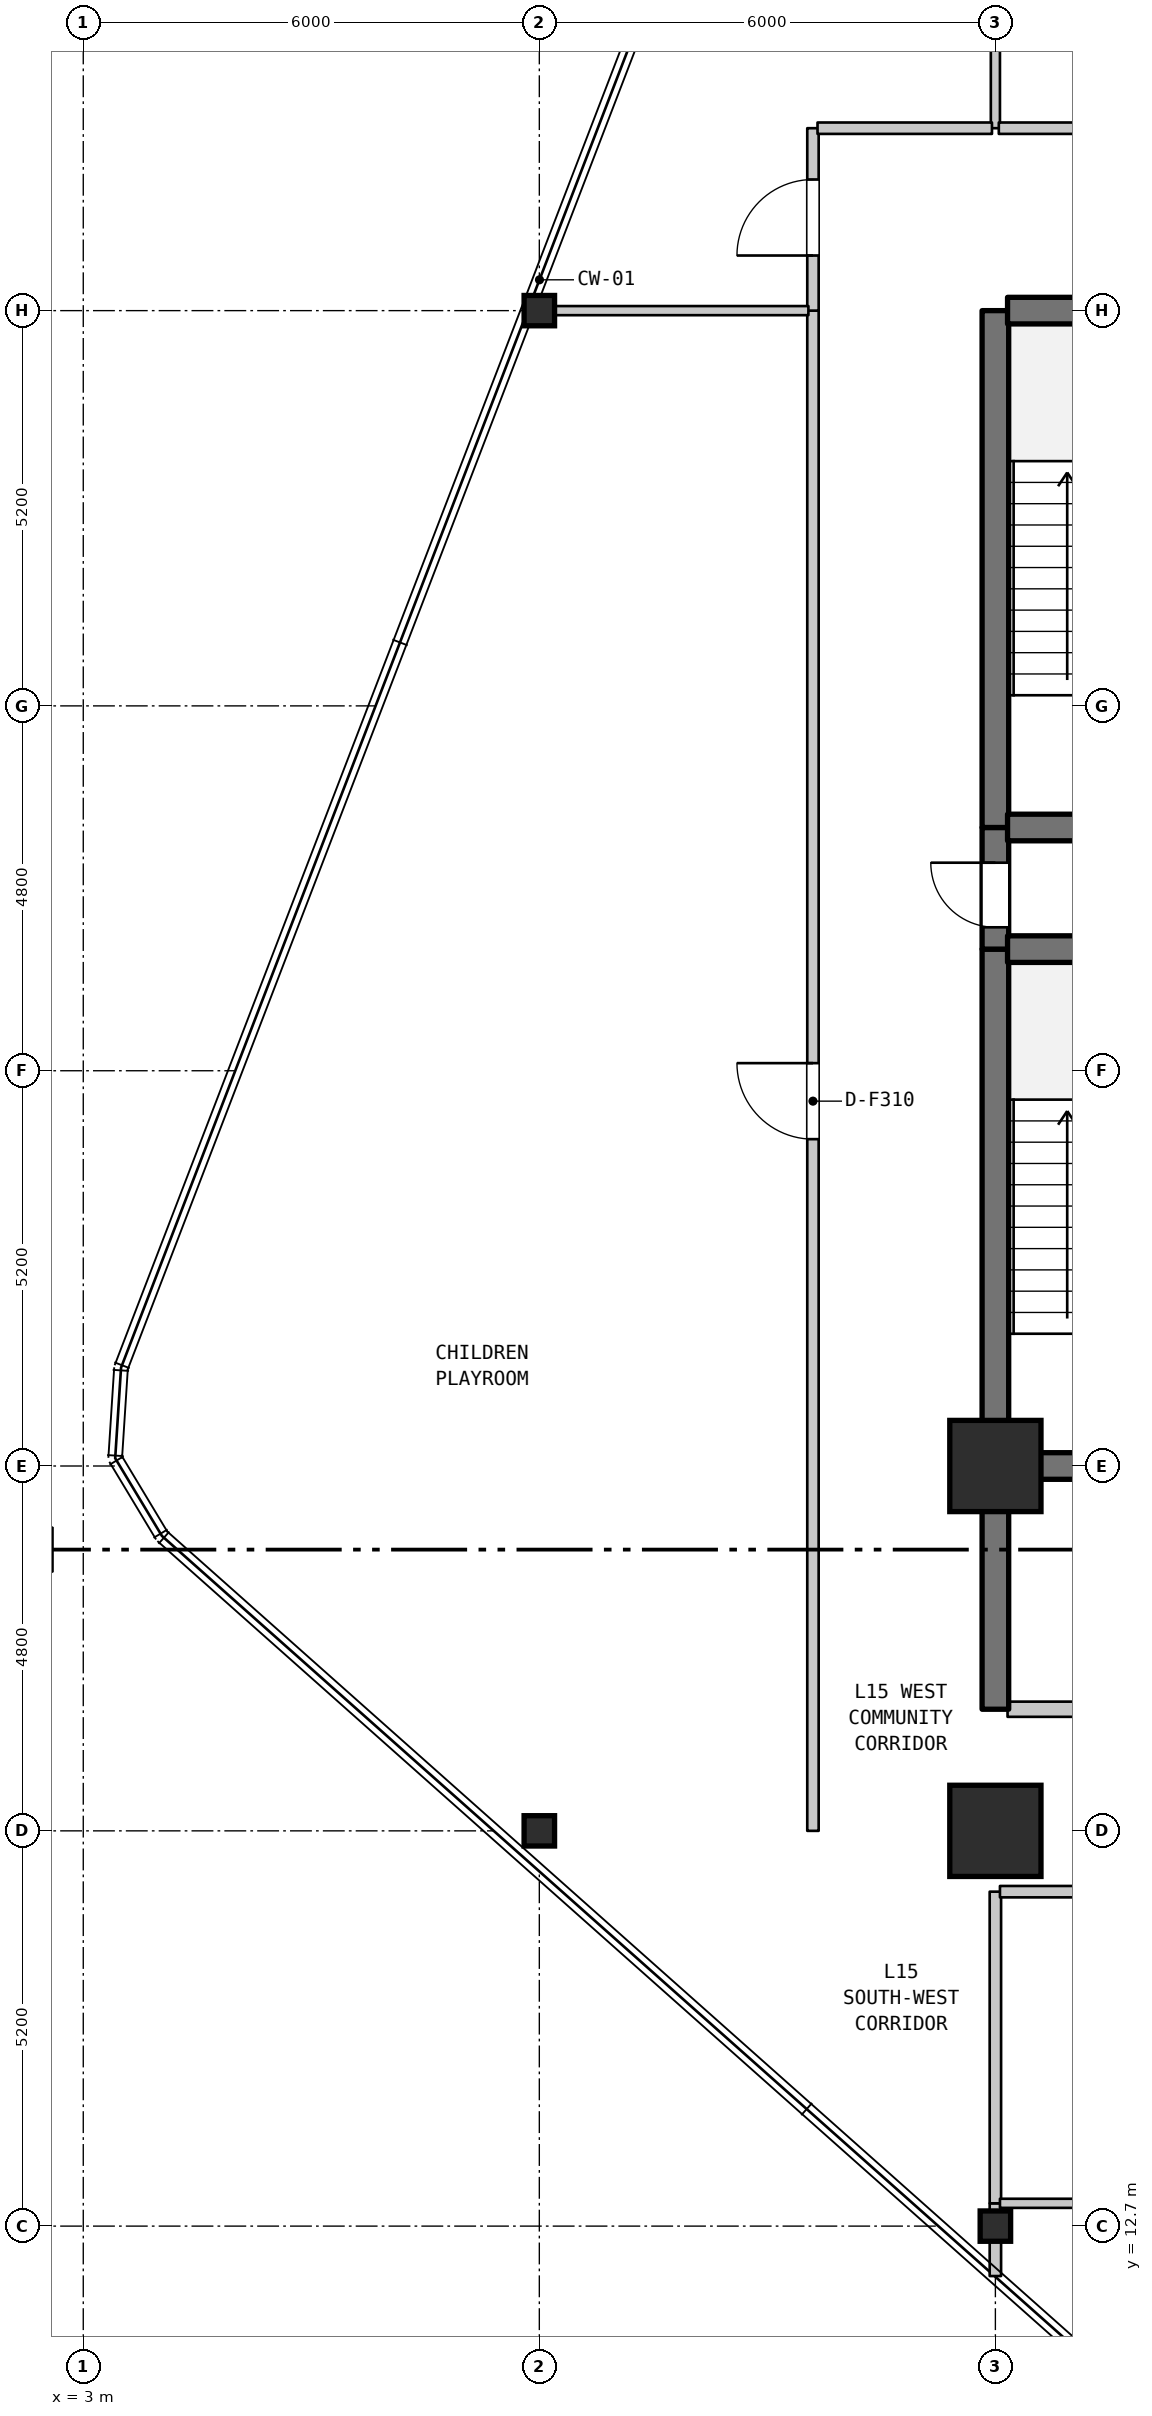
"""IFC4 building model, lengths in metres.
Left out: names, types, materials, properties, quantities, classifications, styles, units other than length and angle.
Written with IfcOpenShell. Run it as: python <this file> out.ifc"""

import sys

from ifc_helpers import new_model, si_unit, direction, frame, frame_2d, origin, origin_2d, place, context, subcontext, project, spatial, rectangle, i_section, extrude, element, fill, save


model = new_model("IFC4")
c1 = context("Model", 3, precision=1e-05, world=origin(), true_north=direction((0.0, 1.0)))
c2 = subcontext(c1, "Body", "Model", "MODEL_VIEW")
j1 = project(units=[si_unit("LENGTHUNIT", "METRE"), si_unit("PLANEANGLEUNIT", "RADIAN")], contexts=[c1])
p1 = place(None, origin())
s1 = spatial("IfcSite", under=j1, at=p1, CompositionType="ELEMENT")
p2 = place(p1, origin())
s2 = spatial("IfcBuilding", under=s1, at=p2, CompositionType="ELEMENT")
p3 = place(p2, frame((0.0, 0.0, 65.6)))
s3 = spatial("IfcBuildingStorey", under=s2, at=p3, CompositionType="ELEMENT", Elevation=65.6)
for number, where, z_axis, x_axis in (
    (1, (9.0, 17.9, 0.0), (0.0, 0.0, 1.0), (1.0, 0.0, 0.0)),
    (2, (9.0, 37.9, 0.0), (0.0, 0.0, 1.0), (1.0, 0.0, 0.0)),
    (3, (15.0, 12.7, 0.0), (0.0, 0.0, 1.0), (1.0, 0.0, 0.0)),
):
    element("IfcColumn", number, at=place(p3, frame(where, z_axis=z_axis, x_axis=x_axis)), inside=s3, PredefinedType="COLUMN", context=c2, shape_type="SweptSolid", body=[
        extrude(i_section(OverallWidth=0.401, OverallDepth=0.399, WebThickness=0.025, FlangeThickness=0.04, FilletRadius=0.015, at=origin_2d()), origin(), (0.0, 0.0, 1.0), 4.5),
    ])
for number, where, z_axis, x_axis in (
    (4, (15.0, 17.9, 0.0), (0.0, 0.0, 1.0), (1.0, 0.0, 0.0)),
    (5, (15.0, 22.7, 0.0), (0.0, 0.0, 1.0), (1.0, 0.0, 0.0)),
):
    element("IfcColumn", number, at=place(p3, frame(where, z_axis=z_axis, x_axis=x_axis)), inside=s3, PredefinedType="COLUMN", context=c2, shape_type="SweptSolid", body=[
        extrude(rectangle(XDim=1.2, YDim=1.2, at=origin_2d()), origin(), (0.0, 0.0, 1.0), 4.5),
    ])
p4 = place(p3, frame((12.6, 17.9, 0.0), z_axis=(0.0, 0.0, 1.0), x_axis=(0.0, 1.0, 0.0)))
e6 = element("IfcWall", 6, at=p4, inside=s3, PredefinedType="STANDARD", context=c2, shape_type="SweptSolid", body=[
    extrude(rectangle(XDim=20.0, YDim=0.15, at=frame_2d((10.0, 0.0))), origin(), (0.0, 0.0, 1.0), 4.185),
])
p5 = place(p4, frame((9.1, 0.0, 0.0)))
e7 = element("IfcOpeningElement", 7, at=p5, cuts=e6, PredefinedType="OPENING", context=c2, shape_type="SweptSolid", body=[
    extrude(rectangle(XDim=1.0, YDim=2.15, at=frame_2d((0.5, 1.075))), frame((0.0, 0.085, 0.0), z_axis=(0.0, -1.0, 0.0), x_axis=(1.0, 0.0, 0.0)), (0.0, 0.0, 1.0), 0.17),
])
p6 = place(p3, frame((12.6, 37.9, 0.0), z_axis=(0.0, 0.0, 1.0), x_axis=(0.0, 1.0, 0.0)))
e8 = element("IfcWall", 8, at=p6, inside=s3, PredefinedType="STANDARD", context=c2, shape_type="SweptSolid", body=[
    extrude(rectangle(XDim=2.4, YDim=0.15, at=frame_2d((1.2, 0.0))), origin(), (0.0, 0.0, 1.0), 4.185),
])
p7 = place(p6, frame((0.725, 0.0, 0.0)))
e9 = element("IfcOpeningElement", 9, at=p7, cuts=e8, PredefinedType="OPENING", context=c2, shape_type="SweptSolid", body=[
    extrude(rectangle(XDim=1.0, YDim=2.15, at=frame_2d((0.5, 1.075))), frame((0.0, 0.085, 0.0), z_axis=(0.0, -1.0, 0.0), x_axis=(1.0, 0.0, 0.0)), (0.0, 0.0, 1.0), 0.17),
])
p8 = place(p3, frame((15.0, 12.043, 0.0), z_axis=(0.0, 0.0, 1.0), x_axis=(0.0, 1.0, 0.0)))
e10 = element("IfcWall", 10, at=p8, inside=s3, PredefinedType="STANDARD", context=c2, shape_type="SweptSolid", body=[
    extrude(rectangle(XDim=0.957, YDim=0.15, at=frame_2d((0.479, 0.0))), origin(), (0.0, 0.0, 1.0), 4.185),
])
p9 = place(p3, frame((15.0, 13.0, 0.0), z_axis=(0.0, 0.0, 1.0), x_axis=(0.0, 1.0, 0.0)))
e11 = element("IfcWall", 11, at=p9, inside=s3, PredefinedType="STANDARD", context=c2, shape_type="SweptSolid", body=[
    extrude(rectangle(XDim=4.1, YDim=0.15, at=frame_2d((2.05, 0.0))), origin(), (0.0, 0.0, 1.0), 3.685),
])
p10 = place(p3, frame((15.0, 19.5, 0.0), z_axis=(0.0, 0.0, 1.0), x_axis=(0.0, 1.0, 0.0)))
e12 = element("IfcWall", 12, at=p10, inside=s3, PredefinedType="SHEAR", context=c2, shape_type="SweptSolid", body=[
    extrude(rectangle(XDim=3.2, YDim=0.35, at=frame_2d((1.6, 0.0))), origin(), (0.0, 0.0, 1.0), 4.185),
])
p11 = place(p3, frame((15.0, 22.7, 0.0), z_axis=(0.0, 0.0, 1.0), x_axis=(0.0, 1.0, 0.0)))
e13 = element("IfcWall", 13, at=p11, inside=s3, PredefinedType="SHEAR", context=c2, shape_type="SweptSolid", body=[
    extrude(rectangle(XDim=6.8, YDim=0.35, at=frame_2d((3.4, 0.0))), origin(), (0.0, 0.0, 1.0), 4.185),
])
p12 = place(p3, frame((15.0, 29.5, 0.0), z_axis=(0.0, 0.0, 1.0), x_axis=(0.0, 1.0, 0.0)))
e14 = element("IfcWall", 14, at=p12, inside=s3, PredefinedType="SHEAR", context=c2, shape_type="SweptSolid", body=[
    extrude(rectangle(XDim=1.6, YDim=0.35, at=frame_2d((0.8, 0.0))), origin(), (0.0, 0.0, 1.0), 4.185),
])
p13 = place(p12, frame((0.287, 0.0, 0.0)))
e15 = element("IfcOpeningElement", 15, at=p13, cuts=e14, PredefinedType="OPENING", context=c2, shape_type="SweptSolid", body=[
    extrude(rectangle(XDim=0.85, YDim=2.1, at=frame_2d((0.425, 1.05))), frame((0.0, 0.185, 0.0), z_axis=(0.0, -1.0, 0.0), x_axis=(1.0, 0.0, 0.0)), (0.0, 0.0, 1.0), 0.37),
])
p14 = place(p3, frame((15.0, 31.1, 0.0), z_axis=(0.0, 0.0, 1.0), x_axis=(0.0, 1.0, 0.0)))
e16 = element("IfcWall", 16, at=p14, inside=s3, PredefinedType="SHEAR", context=c2, shape_type="SweptSolid", body=[
    extrude(rectangle(XDim=6.8, YDim=0.35, at=frame_2d((3.4, 0.0))), origin(), (0.0, 0.0, 1.0), 4.185),
])
p15 = place(p3, frame((15.0, 40.3, 0.0), z_axis=(0.0, 0.0, 1.0), x_axis=(0.0, 1.0, 0.0)))
e17 = element("IfcWall", 17, at=p15, inside=s3, PredefinedType="PARTITIONING", context=c2, shape_type="SweptSolid", body=[
    extrude(rectangle(XDim=12.933, YDim=0.12, at=frame_2d((6.466, 0.0))), origin(), (0.0, 0.0, 1.0), 4.185),
])
p16 = place(p3, frame((15.06, 13.0, 0.0), z_axis=(0.0, 0.0, 1.0), x_axis=(1.0, 0.0, 0.0)))
e18 = element("IfcWall", 18, at=p16, inside=s3, PredefinedType="PARTITIONING", context=c2, shape_type="SweptSolid", body=[
    extrude(rectangle(XDim=6.695, YDim=0.12, at=frame_2d((3.347, 0.0))), origin(), (0.0, 0.0, 1.0), 4.185),
])
p17 = place(p3, frame((15.06, 17.1, 0.0), z_axis=(0.0, 0.0, 1.0), x_axis=(1.0, 0.0, 0.0)))
e19 = element("IfcWall", 19, at=p17, inside=s3, PredefinedType="STANDARD", context=c2, shape_type="SweptSolid", body=[
    extrude(rectangle(XDim=8.295, YDim=0.15, at=frame_2d((4.147, 0.0))), origin(), (0.0, 0.0, 1.0), 4.185),
])
p18 = place(p17, frame((1.595, 0.0, 0.0)))
e20 = element("IfcOpeningElement", 20, at=p18, cuts=e19, PredefinedType="OPENING", context=c2, shape_type="SweptSolid", body=[
    extrude(rectangle(XDim=0.9, YDim=2.1, at=frame_2d((0.45, 1.05))), frame((0.0, 0.085, 0.0), z_axis=(0.0, -1.0, 0.0), x_axis=(1.0, 0.0, 0.0)), (0.0, 0.0, 1.0), 0.17),
])
p19 = place(p17, frame((5.645, 0.0, 0.0)))
e21 = element("IfcOpeningElement", 21, at=p19, cuts=e19, PredefinedType="OPENING", context=c2, shape_type="SweptSolid", body=[
    extrude(rectangle(XDim=0.9, YDim=2.1, at=frame_2d((0.45, 1.05))), frame((0.0, 0.085, 0.0), z_axis=(0.0, -1.0, 0.0), x_axis=(1.0, 0.0, 0.0)), (0.0, 0.0, 1.0), 0.17),
])
p20 = place(p3, frame((15.16, 19.5, 0.0), z_axis=(0.0, 0.0, 1.0), x_axis=(1.0, 0.0, 0.0)))
e22 = element("IfcWall", 22, at=p20, inside=s3, PredefinedType="STANDARD", context=c2, shape_type="SweptSolid", body=[
    extrude(rectangle(XDim=3.68, YDim=0.2, at=frame_2d((1.84, 0.0))), origin(), (0.0, 0.0, 1.0), 4.185),
])
p21 = place(p20, frame((1.39, 0.0, 0.0)))
e23 = element("IfcOpeningElement", 23, at=p21, cuts=e22, PredefinedType="OPENING", context=c2, shape_type="SweptSolid", body=[
    extrude(rectangle(XDim=0.9, YDim=2.15, at=frame_2d((0.45, 1.075))), frame((0.0, 0.11, 0.0), z_axis=(0.0, -1.0, 0.0), x_axis=(1.0, 0.0, 0.0)), (0.0, 0.0, 1.0), 0.22),
])
for number, where, z_axis, x_axis in (
    (24, (15.16, 22.7, 0.0), (0.0, 0.0, 1.0), (1.0, 0.0, 0.0)),
    (25, (15.16, 29.5, 0.0), (0.0, 0.0, 1.0), (1.0, 0.0, 0.0)),
    (26, (15.16, 31.1, 0.0), (0.0, 0.0, 1.0), (1.0, 0.0, 0.0)),
):
    element("IfcWall", number, at=place(p3, frame(where, z_axis=z_axis, x_axis=x_axis)), inside=s3, PredefinedType="SHEAR", context=c2, shape_type="SweptSolid", body=[
        extrude(rectangle(XDim=3.68, YDim=0.35, at=frame_2d((1.84, 0.0))), origin(), (0.0, 0.0, 1.0), 4.185),
    ])
p22 = place(p3, frame((8.856, 37.9, 0.0), z_axis=(0.0, 0.0, 1.0), x_axis=(1.0, 0.0, 0.0)))
e27 = element("IfcWall", 27, at=p22, inside=s3, PredefinedType="PARTITIONING", context=c2, shape_type="SweptSolid", body=[
    extrude(rectangle(XDim=3.684, YDim=0.12, at=frame_2d((1.842, 0.0))), origin(), (0.0, 0.0, 1.0), 3.685),
])
p23 = place(p3, frame((15.16, 37.9, 0.0), z_axis=(0.0, 0.0, 1.0), x_axis=(1.0, 0.0, 0.0)))
e28 = element("IfcWall", 28, at=p23, inside=s3, PredefinedType="SHEAR", context=c2, shape_type="SweptSolid", body=[
    extrude(rectangle(XDim=3.68, YDim=0.35, at=frame_2d((1.84, 0.0))), origin(), (0.0, 0.0, 1.0), 4.185),
])
p24 = place(p3, frame((12.66, 40.3, 0.0), z_axis=(0.0, 0.0, 1.0), x_axis=(1.0, 0.0, 0.0)))
e29 = element("IfcWall", 29, at=p24, inside=s3, PredefinedType="STANDARD", context=c2, shape_type="SweptSolid", body=[
    extrude(rectangle(XDim=2.295, YDim=0.15, at=frame_2d((1.147, 0.0))), origin(), (0.0, 0.0, 1.0), 4.185),
])
p25 = place(p3, frame((15.045, 40.3, 0.0), z_axis=(0.0, 0.0, 1.0), x_axis=(1.0, 0.0, 0.0)))
e30 = element("IfcWall", 30, at=p25, inside=s3, PredefinedType="STANDARD", context=c2, shape_type="SweptSolid", body=[
    extrude(rectangle(XDim=17.895, YDim=0.15, at=frame_2d((8.948, 0.0))), origin(), (0.0, 0.0, 1.0), 4.185),
])
p26 = place(p25, frame((9.205, 0.0, 0.0)))
e31 = element("IfcOpeningElement", 31, at=p26, cuts=e30, PredefinedType="OPENING", context=c2, shape_type="SweptSolid", body=[
    extrude(rectangle(XDim=1.0, YDim=2.15, at=frame_2d((0.5, 1.075))), frame((0.0, 0.085, 0.0), z_axis=(0.0, -1.0, 0.0), x_axis=(1.0, 0.0, 0.0)), (0.0, 0.0, 1.0), 0.17),
])
p27 = place(p5, origin())
e32 = element("IfcDoor", 32, at=p27, inside=s3, OperationType="SINGLE_SWING_RIGHT", PredefinedType="DOOR", context=c2, shape_type="SweptSolid", body=[
    extrude(rectangle(XDim=1.0, YDim=2.15, at=frame_2d((0.5, 1.075))), frame((0.0, 0.025, 0.0), z_axis=(0.0, -1.0, 0.0), x_axis=(1.0, 0.0, 0.0)), (0.0, 0.0, 1.0), 0.05),
])
fill(e7, e32)
p28 = place(p7, origin())
e33 = element("IfcDoor", 33, at=p28, inside=s3, OperationType="SINGLE_SWING_LEFT", PredefinedType="DOOR", context=c2, shape_type="SweptSolid", body=[
    extrude(rectangle(XDim=1.0, YDim=2.15, at=frame_2d((0.5, 1.075))), frame((0.0, 0.025, 0.0), z_axis=(0.0, -1.0, 0.0), x_axis=(1.0, 0.0, 0.0)), (0.0, 0.0, 1.0), 0.05),
])
fill(e9, e33)
p29 = place(p13, origin())
e34 = element("IfcDoor", 34, at=p29, inside=s3, OperationType="SINGLE_SWING_RIGHT", PredefinedType="DOOR", context=c2, shape_type="SweptSolid", body=[
    extrude(rectangle(XDim=0.85, YDim=2.1, at=frame_2d((0.425, 1.05))), frame((0.0, 0.025, 0.0), z_axis=(0.0, -1.0, 0.0), x_axis=(1.0, 0.0, 0.0)), (0.0, 0.0, 1.0), 0.05),
])
fill(e15, e34)
save(model, sys.argv[1])
